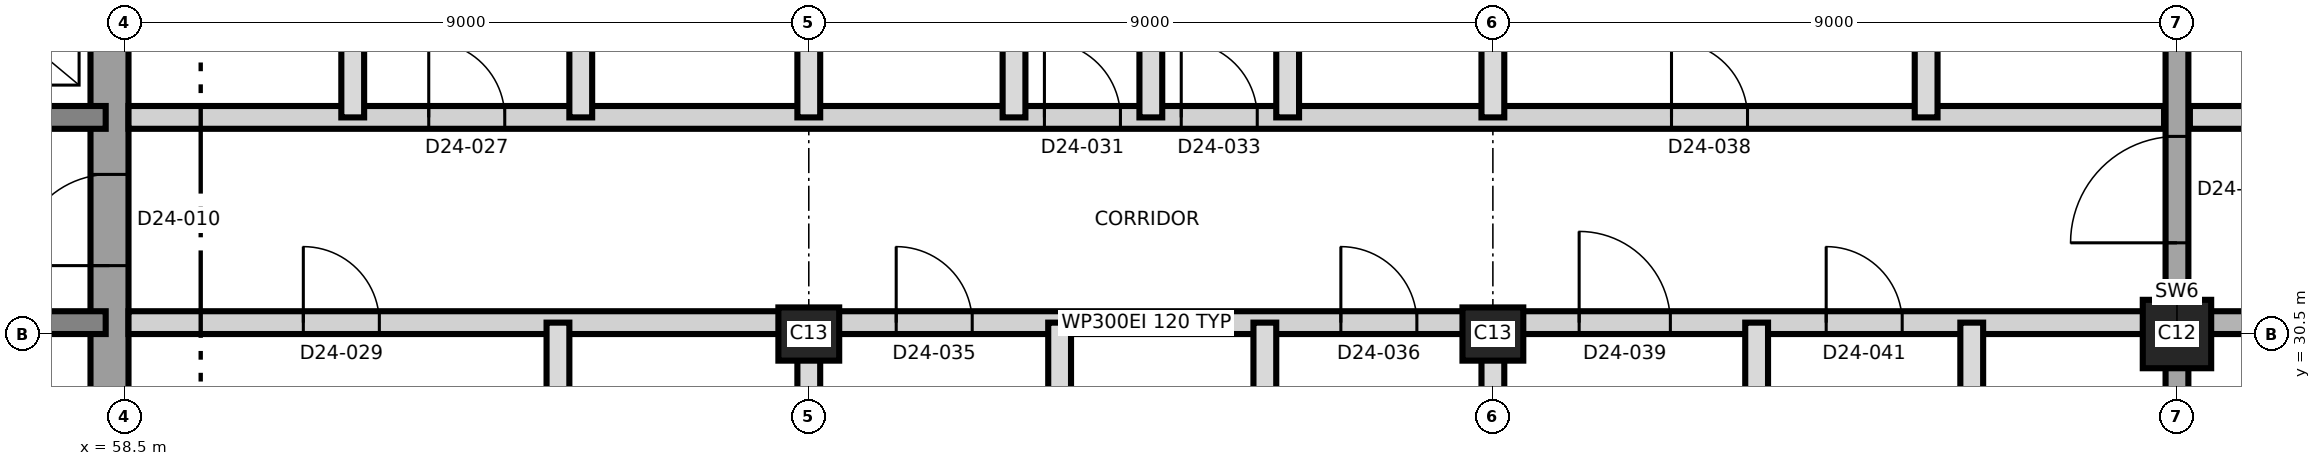
"""IFC4 building model, lengths in metres.
Left out: names, types, materials, properties, quantities, classifications, styles, units other than length and angle.
Written with IfcOpenShell. Run it as: python <this file> out.ifc"""

import sys

from ifc_helpers import new_model, si_unit, direction, frame, frame_2d, origin, origin_2d, place, context, subcontext, project, spatial, rectangle, extrude, element, fill, save


model = new_model("IFC4")
c1 = context("Model", 3, precision=1e-05, world=origin(), true_north=direction((0.0, 1.0)))
c2 = subcontext(c1, "Body", "Model", "MODEL_VIEW")
j1 = project(units=[si_unit("LENGTHUNIT", "METRE"), si_unit("PLANEANGLEUNIT", "RADIAN")], contexts=[c1])
p1 = place(None, origin())
s1 = spatial("IfcSite", under=j1, at=p1, CompositionType="ELEMENT")
p2 = place(p1, origin())
s2 = spatial("IfcBuilding", under=s1, at=p2, CompositionType="ELEMENT")
p3 = place(p2, frame((0.0, 0.0, 214.3)))
s3 = spatial("IfcBuildingStorey", under=s2, at=p3, CompositionType="ELEMENT", Elevation=214.3)
p4 = place(p3, frame((58.3, 21.25, 0.0), z_axis=(0.0, 0.0, 1.0), x_axis=(0.0, 1.0, 0.0)))
e1 = element("IfcWall", 1, at=p4, inside=s3, PredefinedType="SHEAR", context=c2, shape_type="SweptSolid", body=[
    extrude(rectangle(XDim=18.5, YDim=0.5, at=frame_2d((9.25, 0.0))), origin(), (0.0, 0.0, 1.0), 3.7),
])
p5 = place(p4, frame((10.15, 0.0, 0.0)))
e2 = element("IfcOpeningElement", 2, at=p5, cuts=e1, PredefinedType="OPENING", context=c2, shape_type="SweptSolid", body=[
    extrude(rectangle(XDim=1.2, YDim=2.1, at=frame_2d((0.6, 1.05))), frame((0.0, 0.26, 0.0), z_axis=(0.0, -1.0, 0.0), x_axis=(1.0, 0.0, 0.0)), (0.0, 0.0, 1.0), 0.52),
])
p6 = place(p3, frame((31.75, 30.65, 0.0), z_axis=(0.0, 0.0, 1.0), x_axis=(1.0, 0.0, 0.0)))
e3 = element("IfcWall", 3, at=p6, inside=s3, PredefinedType="SHEAR", context=c2, shape_type="SweptSolid", body=[
    extrude(rectangle(XDim=26.5, YDim=0.3, at=frame_2d((13.25, 0.0))), origin(), (0.0, 0.0, 1.0), 3.7),
])
p7 = place(p6, frame((24.75, 0.0, 0.0)))
e4 = element("IfcOpeningElement", 4, at=p7, cuts=e3, PredefinedType="OPENING", context=c2, shape_type="SweptSolid", body=[
    extrude(rectangle(XDim=1.0, YDim=2.1, at=frame_2d((0.5, 1.05))), frame((0.0, 0.16, 0.0), z_axis=(0.0, -1.0, 0.0), x_axis=(1.0, 0.0, 0.0)), (0.0, 0.0, 1.0), 0.32),
])
p8 = place(p3, frame((31.75, 33.35, 0.0), z_axis=(0.0, 0.0, 1.0), x_axis=(1.0, 0.0, 0.0)))
e5 = element("IfcWall", 5, at=p8, inside=s3, PredefinedType="SHEAR", context=c2, shape_type="SweptSolid", body=[
    extrude(rectangle(XDim=26.5, YDim=0.3, at=frame_2d((13.25, 0.0))), origin(), (0.0, 0.0, 1.0), 3.7),
])
p9 = place(p8, frame((13.9, 0.0, 0.0)))
e6 = element("IfcOpeningElement", 6, at=p9, cuts=e5, PredefinedType="OPENING", context=c2, shape_type="SweptSolid", body=[
    extrude(rectangle(XDim=1.4, YDim=2.1, at=frame_2d((0.7, 1.05))), frame((0.0, 0.16, 0.0), z_axis=(0.0, -1.0, 0.0), x_axis=(1.0, 0.0, 0.0)), (0.0, 0.0, 1.0), 0.32),
])
p10 = place(p8, frame((5.375, 0.0, 0.0)))
e7 = element("IfcOpeningElement", 7, at=p10, cuts=e5, PredefinedType="OPENING", context=c2, shape_type="SweptSolid", body=[
    extrude(rectangle(XDim=1.2, YDim=2.1, at=frame_2d((0.6, 1.05))), frame((0.0, 0.16, 0.0), z_axis=(0.0, -1.0, 0.0), x_axis=(1.0, 0.0, 0.0)), (0.0, 0.0, 1.0), 0.32),
])
p11 = place(p8, frame((19.925, 0.0, 0.0)))
e8 = element("IfcOpeningElement", 8, at=p11, cuts=e5, PredefinedType="OPENING", context=c2, shape_type="SweptSolid", body=[
    extrude(rectangle(XDim=1.2, YDim=2.1, at=frame_2d((0.6, 1.05))), frame((0.0, 0.16, 0.0), z_axis=(0.0, -1.0, 0.0), x_axis=(1.0, 0.0, 0.0)), (0.0, 0.0, 1.0), 0.32),
])
for number, where, z_axis, x_axis in (
    (9, (67.5, 30.5, 0.0), (0.0, 0.0, 1.0), (1.0, 0.0, 0.0)),
    (10, (76.5, 30.5, 0.0), (0.0, 0.0, 1.0), (1.0, 0.0, 0.0)),
):
    element("IfcColumn", number, at=place(p3, frame(where, z_axis=z_axis, x_axis=x_axis)), inside=s3, PredefinedType="COLUMN", context=c2, shape_type="SweptSolid", body=[
        extrude(rectangle(XDim=0.8, YDim=0.7, at=origin_2d()), origin(), (0.0, 0.0, 1.0), 3.7),
    ])
p12 = place(p3, frame((85.5, 30.5, 0.0), z_axis=(0.0, 0.0, 1.0), x_axis=(1.0, 0.0, 0.0)))
e11 = element("IfcColumn", 11, at=p12, inside=s3, PredefinedType="COLUMN", context=c2, shape_type="SweptSolid", body=[
    extrude(rectangle(XDim=0.9, YDim=0.9, at=origin_2d()), origin(), (0.0, 0.0, 1.0), 3.7),
])
p13 = place(p3, frame((85.5, 21.53, 0.0), z_axis=(0.0, 0.0, 1.0), x_axis=(0.0, 1.0, 0.0)))
e12 = element("IfcWall", 12, at=p13, inside=s3, PredefinedType="SHEAR", context=c2, shape_type="SweptSolid", body=[
    extrude(rectangle(XDim=17.94, YDim=0.3, at=frame_2d((8.97, 0.0))), origin(), (0.0, 0.0, 1.0), 3.7),
])
p14 = place(p13, frame((10.17, 0.0, 0.0)))
e13 = element("IfcOpeningElement", 13, at=p14, cuts=e12, PredefinedType="OPENING", context=c2, shape_type="SweptSolid", body=[
    extrude(rectangle(XDim=1.4, YDim=2.1, at=frame_2d((0.7, 1.05))), frame((0.0, 0.16, 0.0), z_axis=(0.0, -1.0, 0.0), x_axis=(1.0, 0.0, 0.0)), (0.0, 0.0, 1.0), 0.32),
])
p15 = place(p3, frame((58.55, 30.65, 0.0), z_axis=(0.0, 0.0, 1.0), x_axis=(1.0, 0.0, 0.0)))
e14 = element("IfcWall", 14, at=p15, inside=s3, PredefinedType="PARTITIONING", context=c2, shape_type="SweptSolid", body=[
    extrude(rectangle(XDim=26.78, YDim=0.3, at=frame_2d((13.39, 0.0))), origin(), (0.0, 0.0, 1.0), 3.4),
])
p16 = place(p15, frame((2.3, 0.0, 0.0)))
e15 = element("IfcOpeningElement", 15, at=p16, cuts=e14, PredefinedType="OPENING", context=c2, shape_type="SweptSolid", body=[
    extrude(rectangle(XDim=1.0, YDim=2.4, at=frame_2d((0.5, 1.2))), frame((0.0, 0.16, 0.0), z_axis=(0.0, -1.0, 0.0), x_axis=(1.0, 0.0, 0.0)), (0.0, 0.0, 1.0), 0.32),
])
p17 = place(p15, frame((10.1, 0.0, 0.0)))
e16 = element("IfcOpeningElement", 16, at=p17, cuts=e14, PredefinedType="OPENING", context=c2, shape_type="SweptSolid", body=[
    extrude(rectangle(XDim=1.0, YDim=2.1, at=frame_2d((0.5, 1.05))), frame((0.0, 0.16, 0.0), z_axis=(0.0, -1.0, 0.0), x_axis=(1.0, 0.0, 0.0)), (0.0, 0.0, 1.0), 0.32),
])
p18 = place(p15, frame((15.95, 0.0, 0.0)))
e17 = element("IfcOpeningElement", 17, at=p18, cuts=e14, PredefinedType="OPENING", context=c2, shape_type="SweptSolid", body=[
    extrude(rectangle(XDim=1.0, YDim=2.1, at=frame_2d((0.5, 1.05))), frame((0.0, 0.16, 0.0), z_axis=(0.0, -1.0, 0.0), x_axis=(1.0, 0.0, 0.0)), (0.0, 0.0, 1.0), 0.32),
])
p19 = place(p15, frame((19.085, 0.0, 0.0)))
e18 = element("IfcOpeningElement", 18, at=p19, cuts=e14, PredefinedType="OPENING", context=c2, shape_type="SweptSolid", body=[
    extrude(rectangle(XDim=1.2, YDim=2.1, at=frame_2d((0.6, 1.05))), frame((0.0, 0.16, 0.0), z_axis=(0.0, -1.0, 0.0), x_axis=(1.0, 0.0, 0.0)), (0.0, 0.0, 1.0), 0.32),
])
p20 = place(p15, frame((22.335, 0.0, 0.0)))
e19 = element("IfcOpeningElement", 19, at=p20, cuts=e14, PredefinedType="OPENING", context=c2, shape_type="SweptSolid", body=[
    extrude(rectangle(XDim=1.0, YDim=2.1, at=frame_2d((0.5, 1.05))), frame((0.0, 0.16, 0.0), z_axis=(0.0, -1.0, 0.0), x_axis=(1.0, 0.0, 0.0)), (0.0, 0.0, 1.0), 0.32),
])
p21 = place(p3, frame((85.67, 30.65, 0.0), z_axis=(0.0, 0.0, 1.0), x_axis=(1.0, 0.0, 0.0)))
e20 = element("IfcWall", 20, at=p21, inside=s3, PredefinedType="SHEAR", context=c2, shape_type="SweptSolid", body=[
    extrude(rectangle(XDim=8.8, YDim=0.3, at=frame_2d((4.4, 0.0))), origin(), (0.0, 0.0, 1.0), 3.4),
])
p22 = place(p21, frame((2.08, 0.0, 0.0)))
e21 = element("IfcOpeningElement", 21, at=p22, cuts=e20, PredefinedType="OPENING", context=c2, shape_type="SweptSolid", body=[
    extrude(rectangle(XDim=1.2, YDim=2.1, at=frame_2d((0.6, 1.05))), frame((0.0, 0.16, 0.0), z_axis=(0.0, -1.0, 0.0), x_axis=(1.0, 0.0, 0.0)), (0.0, 0.0, 1.0), 0.32),
])
p23 = place(p21, frame((5.63, 0.0, 0.0)))
e22 = element("IfcOpeningElement", 22, at=p23, cuts=e20, PredefinedType="OPENING", context=c2, shape_type="SweptSolid", body=[
    extrude(rectangle(XDim=1.0, YDim=2.1, at=frame_2d((0.5, 1.05))), frame((0.0, 0.16, 0.0), z_axis=(0.0, -1.0, 0.0), x_axis=(1.0, 0.0, 0.0)), (0.0, 0.0, 1.0), 0.32),
])
p24 = place(p3, frame((58.55, 33.35, 0.0), z_axis=(0.0, 0.0, 1.0), x_axis=(1.0, 0.0, 0.0)))
e23 = element("IfcWall", 23, at=p24, inside=s3, PredefinedType="PARTITIONING", context=c2, shape_type="SweptSolid", body=[
    extrude(rectangle(XDim=26.78, YDim=0.3, at=frame_2d((13.39, 0.0))), origin(), (0.0, 0.0, 1.0), 3.4),
])
p25 = place(p24, frame((3.95, 0.0, 0.0)))
e24 = element("IfcOpeningElement", 24, at=p25, cuts=e23, PredefinedType="OPENING", context=c2, shape_type="SweptSolid", body=[
    extrude(rectangle(XDim=1.0, YDim=2.4, at=frame_2d((0.5, 1.2))), frame((0.0, 0.16, 0.0), z_axis=(0.0, -1.0, 0.0), x_axis=(1.0, 0.0, 0.0)), (0.0, 0.0, 1.0), 0.32),
])
p26 = place(p24, frame((12.05, 0.0, 0.0)))
e25 = element("IfcOpeningElement", 25, at=p26, cuts=e23, PredefinedType="OPENING", context=c2, shape_type="SweptSolid", body=[
    extrude(rectangle(XDim=1.0, YDim=2.1, at=frame_2d((0.5, 1.05))), frame((0.0, 0.16, 0.0), z_axis=(0.0, -1.0, 0.0), x_axis=(1.0, 0.0, 0.0)), (0.0, 0.0, 1.0), 0.32),
])
p27 = place(p24, frame((13.85, 0.0, 0.0)))
e26 = element("IfcOpeningElement", 26, at=p27, cuts=e23, PredefinedType="OPENING", context=c2, shape_type="SweptSolid", body=[
    extrude(rectangle(XDim=1.0, YDim=2.1, at=frame_2d((0.5, 1.05))), frame((0.0, 0.16, 0.0), z_axis=(0.0, -1.0, 0.0), x_axis=(1.0, 0.0, 0.0)), (0.0, 0.0, 1.0), 0.32),
])
p28 = place(p24, frame((20.3, 0.0, 0.0)))
e27 = element("IfcOpeningElement", 27, at=p28, cuts=e23, PredefinedType="OPENING", context=c2, shape_type="SweptSolid", body=[
    extrude(rectangle(XDim=1.0, YDim=2.4, at=frame_2d((0.5, 1.2))), frame((0.0, 0.16, 0.0), z_axis=(0.0, -1.0, 0.0), x_axis=(1.0, 0.0, 0.0)), (0.0, 0.0, 1.0), 0.32),
])
p29 = place(p3, frame((85.67, 33.35, 0.0), z_axis=(0.0, 0.0, 1.0), x_axis=(1.0, 0.0, 0.0)))
e28 = element("IfcWall", 28, at=p29, inside=s3, PredefinedType="PARTITIONING", context=c2, shape_type="SweptSolid", body=[
    extrude(rectangle(XDim=8.685, YDim=0.3, at=frame_2d((4.343, 0.0))), origin(), (0.0, 0.0, 1.0), 3.4),
])
p30 = place(p29, frame((1.83, 0.0, 0.0)))
e29 = element("IfcOpeningElement", 29, at=p30, cuts=e28, PredefinedType="OPENING", context=c2, shape_type="SweptSolid", body=[
    extrude(rectangle(XDim=1.0, YDim=2.1, at=frame_2d((0.5, 1.05))), frame((0.0, 0.16, 0.0), z_axis=(0.0, -1.0, 0.0), x_axis=(1.0, 0.0, 0.0)), (0.0, 0.0, 1.0), 0.32),
])
p31 = place(p29, frame((5.63, 0.0, 0.0)))
e30 = element("IfcOpeningElement", 30, at=p31, cuts=e28, PredefinedType="OPENING", context=c2, shape_type="SweptSolid", body=[
    extrude(rectangle(XDim=1.0, YDim=2.1, at=frame_2d((0.5, 1.05))), frame((0.0, 0.16, 0.0), z_axis=(0.0, -1.0, 0.0), x_axis=(1.0, 0.0, 0.0)), (0.0, 0.0, 1.0), 0.32),
])
p32 = place(p3, frame((61.5, 33.35, 0.0), z_axis=(0.0, 0.0, 1.0), x_axis=(0.0, 1.0, 0.0)))
e31 = element("IfcWall", 31, at=p32, inside=s3, PredefinedType="PARTITIONING", context=c2, shape_type="SweptSolid", body=[
    extrude(rectangle(XDim=3.3, YDim=0.3, at=frame_2d((1.65, 0.0))), origin(), (0.0, 0.0, 1.0), 3.4),
])
p33 = place(p3, frame((64.2, 27.15, 0.0), z_axis=(0.0, 0.0, 1.0), x_axis=(0.0, 1.0, 0.0)))
e32 = element("IfcWall", 32, at=p33, inside=s3, PredefinedType="PARTITIONING", context=c2, shape_type="SweptSolid", body=[
    extrude(rectangle(XDim=3.5, YDim=0.3, at=frame_2d((1.75, 0.0))), origin(), (0.0, 0.0, 1.0), 3.4),
])
p34 = place(p3, frame((64.5, 33.35, 0.0), z_axis=(0.0, 0.0, 1.0), x_axis=(0.0, 1.0, 0.0)))
e33 = element("IfcWall", 33, at=p34, inside=s3, PredefinedType="PARTITIONING", context=c2, shape_type="SweptSolid", body=[
    extrude(rectangle(XDim=3.3, YDim=0.3, at=frame_2d((1.65, 0.0))), origin(), (0.0, 0.0, 1.0), 3.4),
])
p35 = place(p3, frame((67.5, 21.53, 0.0), z_axis=(0.0, 0.0, 1.0), x_axis=(0.0, 1.0, 0.0)))
e34 = element("IfcWall", 34, at=p35, inside=s3, PredefinedType="PARTITIONING", context=c2, shape_type="SweptSolid", body=[
    extrude(rectangle(XDim=9.12, YDim=0.3, at=frame_2d((4.56, 0.0))), origin(), (0.0, 0.0, 1.0), 3.4),
])
p36 = place(p3, frame((67.5, 33.35, 0.0), z_axis=(0.0, 0.0, 1.0), x_axis=(0.0, 1.0, 0.0)))
e35 = element("IfcWall", 35, at=p36, inside=s3, PredefinedType="PARTITIONING", context=c2, shape_type="SweptSolid", body=[
    extrude(rectangle(XDim=6.12, YDim=0.3, at=frame_2d((3.06, 0.0))), origin(), (0.0, 0.0, 1.0), 3.4),
])
for number, where, z_axis, x_axis in (
    (36, (70.2, 33.35, 0.0), (0.0, 0.0, 1.0), (0.0, 1.0, 0.0)),
    (37, (70.8, 27.45, 0.0), (0.0, 0.0, 1.0), (0.0, 1.0, 0.0)),
):
    element("IfcWall", number, at=place(p3, frame(where, z_axis=z_axis, x_axis=x_axis)), inside=s3, PredefinedType="PARTITIONING", context=c2, shape_type="SweptSolid", body=[
        extrude(rectangle(XDim=3.2, YDim=0.3, at=frame_2d((1.6, 0.0))), origin(), (0.0, 0.0, 1.0), 3.4),
    ])
p37 = place(p3, frame((72.0, 33.35, 0.0), z_axis=(0.0, 0.0, 1.0), x_axis=(0.0, 1.0, 0.0)))
e38 = element("IfcWall", 38, at=p37, inside=s3, PredefinedType="PARTITIONING", context=c2, shape_type="SweptSolid", body=[
    extrude(rectangle(XDim=6.3, YDim=0.3, at=frame_2d((3.15, 0.0))), origin(), (0.0, 0.0, 1.0), 3.4),
])
p38 = place(p3, frame((73.5, 21.53, 0.0), z_axis=(0.0, 0.0, 1.0), x_axis=(0.0, 1.0, 0.0)))
e39 = element("IfcWall", 39, at=p38, inside=s3, PredefinedType="PARTITIONING", context=c2, shape_type="SweptSolid", body=[
    extrude(rectangle(XDim=9.12, YDim=0.3, at=frame_2d((4.56, 0.0))), origin(), (0.0, 0.0, 1.0), 3.4),
])
p39 = place(p3, frame((73.8, 33.35, 0.0), z_axis=(0.0, 0.0, 1.0), x_axis=(0.0, 1.0, 0.0)))
e40 = element("IfcWall", 40, at=p39, inside=s3, PredefinedType="PARTITIONING", context=c2, shape_type="SweptSolid", body=[
    extrude(rectangle(XDim=3.2, YDim=0.3, at=frame_2d((1.6, 0.0))), origin(), (0.0, 0.0, 1.0), 3.4),
])
p40 = place(p3, frame((76.5, 21.53, 0.0), z_axis=(0.0, 0.0, 1.0), x_axis=(0.0, 1.0, 0.0)))
e41 = element("IfcWall", 41, at=p40, inside=s3, PredefinedType="PARTITIONING", context=c2, shape_type="SweptSolid", body=[
    extrude(rectangle(XDim=9.12, YDim=0.3, at=frame_2d((4.56, 0.0))), origin(), (0.0, 0.0, 1.0), 3.4),
])
p41 = place(p3, frame((76.5, 33.35, 0.0), z_axis=(0.0, 0.0, 1.0), x_axis=(0.0, 1.0, 0.0)))
e42 = element("IfcWall", 42, at=p41, inside=s3, PredefinedType="PARTITIONING", context=c2, shape_type="SweptSolid", body=[
    extrude(rectangle(XDim=6.12, YDim=0.3, at=frame_2d((3.06, 0.0))), origin(), (0.0, 0.0, 1.0), 3.4),
])
p42 = place(p3, frame((79.97, 21.53, 0.0), z_axis=(0.0, 0.0, 1.0), x_axis=(0.0, 1.0, 0.0)))
e43 = element("IfcWall", 43, at=p42, inside=s3, PredefinedType="PARTITIONING", context=c2, shape_type="SweptSolid", body=[
    extrude(rectangle(XDim=9.12, YDim=0.3, at=frame_2d((4.56, 0.0))), origin(), (0.0, 0.0, 1.0), 3.4),
])
p43 = place(p3, frame((82.2, 33.35, 0.0), z_axis=(0.0, 0.0, 1.0), x_axis=(0.0, 1.0, 0.0)))
e44 = element("IfcWall", 44, at=p43, inside=s3, PredefinedType="PARTITIONING", context=c2, shape_type="SweptSolid", body=[
    extrude(rectangle(XDim=3.5, YDim=0.3, at=frame_2d((1.75, 0.0))), origin(), (0.0, 0.0, 1.0), 3.4),
])
p44 = place(p3, frame((82.8, 27.45, 0.0), z_axis=(0.0, 0.0, 1.0), x_axis=(0.0, 1.0, 0.0)))
e45 = element("IfcWall", 45, at=p44, inside=s3, PredefinedType="PARTITIONING", context=c2, shape_type="SweptSolid", body=[
    extrude(rectangle(XDim=3.2, YDim=0.3, at=frame_2d((1.6, 0.0))), origin(), (0.0, 0.0, 1.0), 3.4),
])
p45 = place(p5, origin())
e46 = element("IfcDoor", 46, at=p45, inside=s3, OperationType="SINGLE_SWING_LEFT", PredefinedType="DOOR", context=c2, shape_type="SweptSolid", body=[
    extrude(rectangle(XDim=1.2, YDim=2.1, at=frame_2d((0.6, 1.05))), frame((0.0, 0.025, 0.0), z_axis=(0.0, -1.0, 0.0), x_axis=(1.0, 0.0, 0.0)), (0.0, 0.0, 1.0), 0.05),
])
fill(e2, e46)
p46 = place(p25, origin())
e47 = element("IfcDoor", 47, at=p46, inside=s3, OperationType="SINGLE_SWING_LEFT", PredefinedType="DOOR", context=c2, shape_type="SweptSolid", body=[
    extrude(rectangle(XDim=1.0, YDim=2.4, at=frame_2d((0.5, 1.2))), frame((0.0, 0.025, 0.0), z_axis=(0.0, -1.0, 0.0), x_axis=(1.0, 0.0, 0.0)), (0.0, 0.0, 1.0), 0.05),
])
fill(e24, e47)
p47 = place(p16, origin())
e48 = element("IfcDoor", 48, at=p47, inside=s3, OperationType="SINGLE_SWING_LEFT", PredefinedType="DOOR", context=c2, shape_type="SweptSolid", body=[
    extrude(rectangle(XDim=1.0, YDim=2.4, at=frame_2d((0.5, 1.2))), frame((0.0, 0.025, 0.0), z_axis=(0.0, -1.0, 0.0), x_axis=(1.0, 0.0, 0.0)), (0.0, 0.0, 1.0), 0.05),
])
fill(e15, e48)
p48 = place(p26, origin())
e49 = element("IfcDoor", 49, at=p48, inside=s3, OperationType="SINGLE_SWING_RIGHT", PredefinedType="DOOR", context=c2, shape_type="SweptSolid", body=[
    extrude(rectangle(XDim=1.0, YDim=2.1, at=frame_2d((0.5, 1.05))), frame((0.0, 0.025, 0.0), z_axis=(0.0, -1.0, 0.0), x_axis=(1.0, 0.0, 0.0)), (0.0, 0.0, 1.0), 0.05),
])
fill(e25, e49)
p49 = place(p27, origin())
e50 = element("IfcDoor", 50, at=p49, inside=s3, OperationType="SINGLE_SWING_LEFT", PredefinedType="DOOR", context=c2, shape_type="SweptSolid", body=[
    extrude(rectangle(XDim=1.0, YDim=2.1, at=frame_2d((0.5, 1.05))), frame((0.0, 0.025, 0.0), z_axis=(0.0, -1.0, 0.0), x_axis=(1.0, 0.0, 0.0)), (0.0, 0.0, 1.0), 0.05),
])
fill(e26, e50)
p50 = place(p17, origin())
e51 = element("IfcDoor", 51, at=p50, inside=s3, OperationType="SINGLE_SWING_LEFT", PredefinedType="DOOR", context=c2, shape_type="SweptSolid", body=[
    extrude(rectangle(XDim=1.0, YDim=2.1, at=frame_2d((0.5, 1.05))), frame((0.0, 0.025, 0.0), z_axis=(0.0, -1.0, 0.0), x_axis=(1.0, 0.0, 0.0)), (0.0, 0.0, 1.0), 0.05),
])
fill(e16, e51)
p51 = place(p18, origin())
e52 = element("IfcDoor", 52, at=p51, inside=s3, OperationType="SINGLE_SWING_RIGHT", PredefinedType="DOOR", context=c2, shape_type="SweptSolid", body=[
    extrude(rectangle(XDim=1.0, YDim=2.1, at=frame_2d((0.5, 1.05))), frame((0.0, 0.025, 0.0), z_axis=(0.0, -1.0, 0.0), x_axis=(1.0, 0.0, 0.0)), (0.0, 0.0, 1.0), 0.05),
])
fill(e17, e52)
p52 = place(p28, origin())
e53 = element("IfcDoor", 53, at=p52, inside=s3, OperationType="SINGLE_SWING_LEFT", PredefinedType="DOOR", context=c2, shape_type="SweptSolid", body=[
    extrude(rectangle(XDim=1.0, YDim=2.4, at=frame_2d((0.5, 1.2))), frame((0.0, 0.025, 0.0), z_axis=(0.0, -1.0, 0.0), x_axis=(1.0, 0.0, 0.0)), (0.0, 0.0, 1.0), 0.05),
])
fill(e27, e53)
p53 = place(p19, origin())
e54 = element("IfcDoor", 54, at=p53, inside=s3, OperationType="SINGLE_SWING_RIGHT", PredefinedType="DOOR", context=c2, shape_type="SweptSolid", body=[
    extrude(rectangle(XDim=1.2, YDim=2.1, at=frame_2d((0.6, 1.05))), frame((0.0, 0.025, 0.0), z_axis=(0.0, -1.0, 0.0), x_axis=(1.0, 0.0, 0.0)), (0.0, 0.0, 1.0), 0.05),
])
fill(e18, e54)
p54 = place(p20, origin())
e55 = element("IfcDoor", 55, at=p54, inside=s3, OperationType="SINGLE_SWING_LEFT", PredefinedType="DOOR", context=c2, shape_type="SweptSolid", body=[
    extrude(rectangle(XDim=1.0, YDim=2.1, at=frame_2d((0.5, 1.05))), frame((0.0, 0.025, 0.0), z_axis=(0.0, -1.0, 0.0), x_axis=(1.0, 0.0, 0.0)), (0.0, 0.0, 1.0), 0.05),
])
fill(e19, e55)
p55 = place(p14, origin())
e56 = element("IfcDoor", 56, at=p55, inside=s3, OperationType="SINGLE_SWING_RIGHT", PredefinedType="DOOR", context=c2, shape_type="SweptSolid", body=[
    extrude(rectangle(XDim=1.4, YDim=2.1, at=frame_2d((0.7, 1.05))), frame((0.0, 0.025, 0.0), z_axis=(0.0, -1.0, 0.0), x_axis=(1.0, 0.0, 0.0)), (0.0, 0.0, 1.0), 0.05),
])
fill(e13, e56)
save(model, sys.argv[1])
